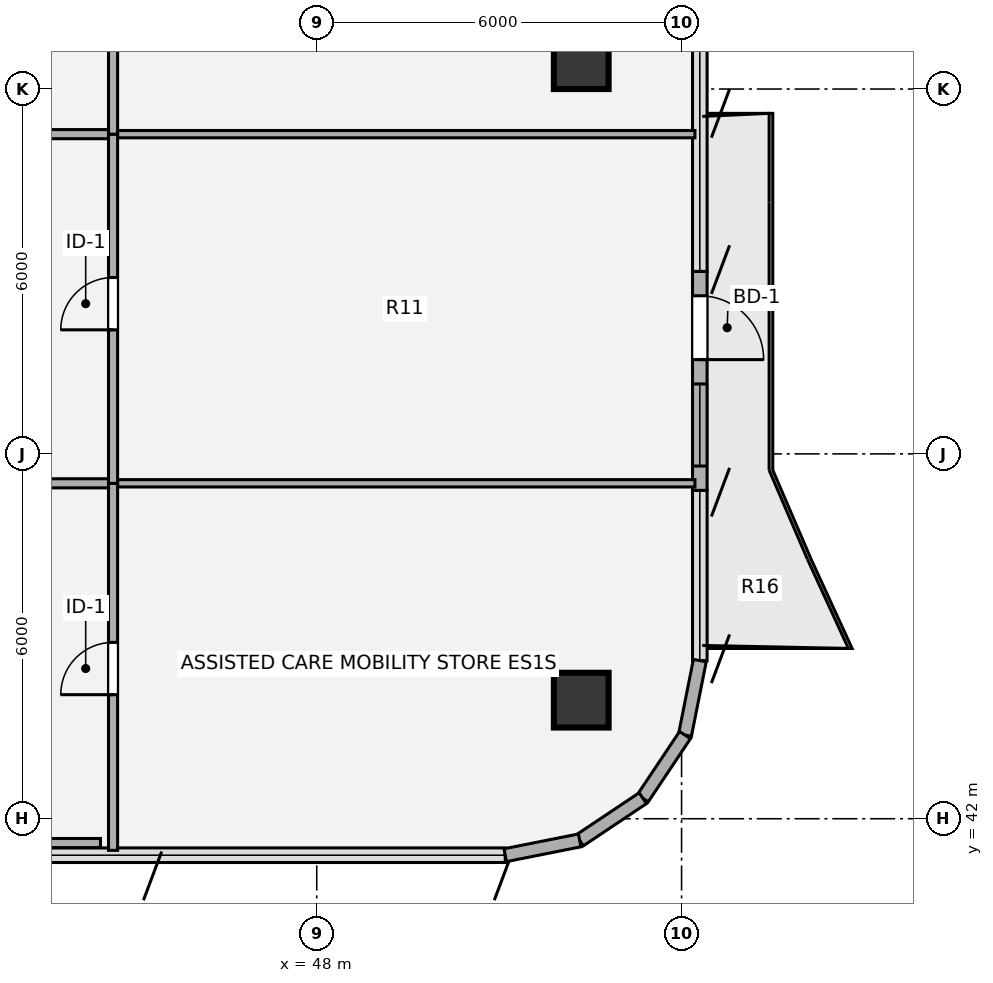
"""IFC4 building model, lengths in metres.
Left out: names, types, materials, properties, quantities, classifications, styles, units other than length and angle.
Written with IfcOpenShell. Run it as: python <this file> out.ifc"""

import sys

from ifc_helpers import new_model, si_unit, direction, frame, frame_2d, origin, origin_2d, place, context, subcontext, project, spatial, rectangle, hollow_circle, extrude, source, transform, mapped, element, fill, save


model = new_model("IFC4")
c1 = context("Model", 3, precision=1e-05, world=origin(), true_north=direction((0.0, 1.0)))
c2 = subcontext(c1, "Body", "Model", "MODEL_VIEW")
j1 = project(units=[si_unit("LENGTHUNIT", "METRE"), si_unit("PLANEANGLEUNIT", "RADIAN")], contexts=[c1])
p1 = place(None, origin())
s1 = spatial("IfcSite", under=j1, at=p1, CompositionType="ELEMENT")
p2 = place(p1, origin())
s2 = spatial("IfcBuilding", under=s1, at=p2, CompositionType="ELEMENT")
p3 = place(p2, frame((0.0, 0.0, 234.36)))
s3 = spatial("IfcBuildingStorey", under=s2, at=p3, CompositionType="ELEMENT", Elevation=234.36)
m1 = source(origin(), c2, "Body", "SweptSolid", [
    extrude(hollow_circle(Radius=0.45, WallThickness=0.032, at=origin_2d()), origin(), (0.0, 0.0, 1.0), 3.78),
])
for number, where, z_axis, x_axis in (
    (1, (52.35, 43.95, 0.0), (0.0, 0.0, 1.0), (1.0, 0.0, 0.0)),
    (2, (52.35, 54.45, 0.0), (0.0, 0.0, 1.0), (1.0, 0.0, 0.0)),
):
    element("IfcColumn", number, at=place(p3, frame(where, z_axis=z_axis, x_axis=x_axis)), inside=s3, PredefinedType="COLUMN", context=c2, shape_type="MappedRepresentation", body=[
        mapped(m1, transform((0.0, 0.0, 0.0), x_axis=(1.0, 0.0, 0.0), y_axis=(0.0, 1.0, 0.0), z_axis=(0.0, 0.0, 1.0), scale=1.0)),
    ])
p4 = place(p3, frame((54.3, 51.0, 0.0), z_axis=(0.0, 0.0, 1.0), x_axis=(0.0, -1.0, 0.0)))
e3 = element("IfcWall", 3, at=p4, inside=s3, PredefinedType="SOLIDWALL", context=c2, shape_type="SweptSolid", body=[
    extrude(rectangle(XDim=3.6, YDim=0.24, at=frame_2d((1.8, 0.0))), origin(), (0.0, 0.0, 1.0), 3.53),
])
p5 = place(p4, frame((0.4, 0.0, 0.0)))
e4 = element("IfcOpeningElement", 4, at=p5, cuts=e3, PredefinedType="OPENING", context=c2, shape_type="SweptSolid", body=[
    extrude(rectangle(XDim=1.05, YDim=2.15, at=origin_2d()), frame((0.525, 0.13, 1.075), z_axis=(0.0, -1.0, 0.0), x_axis=(1.0, 0.0, 0.0)), (0.0, 0.0, 1.0), 0.26),
])
p6 = place(p4, frame((1.85, 0.0, 0.85)))
e5 = element("IfcOpeningElement", 5, at=p6, cuts=e3, PredefinedType="OPENING", context=c2, shape_type="SweptSolid", body=[
    extrude(rectangle(XDim=1.35, YDim=1.35, at=origin_2d()), frame((0.675, 0.13, 0.675), z_axis=(0.0, -1.0, 0.0), x_axis=(1.0, 0.0, 0.0)), (0.0, 0.0, 1.0), 0.26),
])
for number, where, z_axis, x_axis in (
    (6, (54.3, 44.6, 0.0), (0.0, 0.0, 1.0), (-0.195, -0.981, 0.0)),
    (7, (54.056, 43.375, 0.0), (0.0, 0.0, 1.0), (-0.556, -0.831, 0.0)),
    (8, (53.363, 42.337, 0.0), (0.0, 0.0, 1.0), (-0.831, -0.556, 0.0)),
    (9, (52.325, 41.644, 0.0), (0.0, 0.0, 1.0), (-0.981, -0.195, 0.0)),
):
    element("IfcWall", number, at=place(p3, frame(where, z_axis=z_axis, x_axis=x_axis)), inside=s3, PredefinedType="SOLIDWALL", context=c2, shape_type="SweptSolid", body=[
        extrude(rectangle(XDim=1.249, YDim=0.215, at=frame_2d((0.624, 0.0))), origin(), (0.0, 0.0, 1.0), 3.53),
    ])
p7 = place(p3, frame((38.45, 41.6, 0.0), z_axis=(0.0, 0.0, 1.0), x_axis=(1.0, 0.0, 0.0)))
e10 = element("IfcWall", 10, at=p7, inside=s3, PredefinedType="PARTITIONING", context=c2, shape_type="SweptSolid", body=[
    extrude(rectangle(XDim=5.993, YDim=0.15, at=frame_2d((2.997, 0.0))), origin(), (0.0, 0.0, 1.0), 3.5),
])
p8 = place(p3, frame((38.45, 47.516, 0.0), z_axis=(0.0, 0.0, 1.0), x_axis=(1.0, 0.0, 0.0)))
e11 = element("IfcWall", 11, at=p8, inside=s3, PredefinedType="PARTITIONING", context=c2, shape_type="SweptSolid", body=[
    extrude(rectangle(XDim=6.2, YDim=0.15, at=frame_2d((3.1, 0.0))), origin(), (0.0, 0.0, 1.0), 2.982),
])
p9 = place(p3, frame((44.65, 47.516, 0.0), z_axis=(0.0, 0.0, 1.0), x_axis=(1.0, 0.0, 0.0)))
e12 = element("IfcWall", 12, at=p9, inside=s3, PredefinedType="PARTITIONING", context=c2, shape_type="SweptSolid", body=[
    extrude(rectangle(XDim=9.57, YDim=0.12, at=frame_2d((4.785, 0.0))), origin(), (0.0, 0.0, 1.0), 2.982),
])
p10 = place(p3, frame((38.45, 53.258, 0.0), z_axis=(0.0, 0.0, 1.0), x_axis=(1.0, 0.0, 0.0)))
e13 = element("IfcWall", 13, at=p10, inside=s3, PredefinedType="PARTITIONING", context=c2, shape_type="SweptSolid", body=[
    extrude(rectangle(XDim=6.2, YDim=0.15, at=frame_2d((3.1, 0.0))), origin(), (0.0, 0.0, 1.0), 3.055),
])
p11 = place(p3, frame((44.65, 53.258, 0.0), z_axis=(0.0, 0.0, 1.0), x_axis=(1.0, 0.0, 0.0)))
e14 = element("IfcWall", 14, at=p11, inside=s3, PredefinedType="PARTITIONING", context=c2, shape_type="SweptSolid", body=[
    extrude(rectangle(XDim=9.57, YDim=0.12, at=frame_2d((4.785, 0.0))), origin(), (0.0, 0.0, 1.0), 3.055),
])
p12 = place(p3, frame((44.65, 41.48, 0.0), z_axis=(0.0, 0.0, 1.0), x_axis=(0.0, 1.0, 0.0)))
e15 = element("IfcWall", 15, at=p12, inside=s3, PredefinedType="PARTITIONING", context=c2, shape_type="SweptSolid", body=[
    extrude(rectangle(XDim=6.036, YDim=0.15, at=frame_2d((3.018, 0.0))), origin(), (0.0, 0.0, 1.0), 3.5),
])
p13 = place(p12, frame((2.56, 0.0, 0.0)))
e16 = element("IfcOpeningElement", 16, at=p13, cuts=e15, PredefinedType="OPENING", context=c2, shape_type="SweptSolid", body=[
    extrude(rectangle(XDim=0.86, YDim=2.1, at=origin_2d()), frame((0.43, 0.085, 1.05), z_axis=(0.0, -1.0, 0.0), x_axis=(1.0, 0.0, 0.0)), (0.0, 0.0, 1.0), 0.17),
])
p14 = place(p3, frame((44.65, 47.516, 0.0), z_axis=(0.0, 0.0, 1.0), x_axis=(0.0, 1.0, 0.0)))
e17 = element("IfcWall", 17, at=p14, inside=s3, PredefinedType="PARTITIONING", context=c2, shape_type="SweptSolid", body=[
    extrude(rectangle(XDim=5.742, YDim=0.15, at=frame_2d((2.871, 0.0))), origin(), (0.0, 0.0, 1.0), 3.5),
])
p15 = place(p14, frame((2.524, 0.0, 0.0)))
e18 = element("IfcOpeningElement", 18, at=p15, cuts=e17, PredefinedType="OPENING", context=c2, shape_type="SweptSolid", body=[
    extrude(rectangle(XDim=0.86, YDim=2.1, at=origin_2d()), frame((0.43, 0.085, 1.05), z_axis=(0.0, -1.0, 0.0), x_axis=(1.0, 0.0, 0.0)), (0.0, 0.0, 1.0), 0.17),
])
p16 = place(p3, frame((44.65, 53.258, 0.0), z_axis=(0.0, 0.0, 1.0), x_axis=(0.0, 1.0, 0.0)))
e19 = element("IfcWall", 19, at=p16, inside=s3, PredefinedType="PARTITIONING", context=c2, shape_type="SweptSolid", body=[
    extrude(rectangle(XDim=6.064, YDim=0.15, at=frame_2d((3.032, 0.0))), origin(), (0.0, 0.0, 1.0), 3.5),
])
p17 = place(p16, frame((2.782, 0.0, 0.0)))
e20 = element("IfcOpeningElement", 20, at=p17, cuts=e19, PredefinedType="OPENING", context=c2, shape_type="SweptSolid", body=[
    extrude(rectangle(XDim=0.86, YDim=2.1, at=origin_2d()), frame((0.43, 0.085, 1.05), z_axis=(0.0, -1.0, 0.0), x_axis=(1.0, 0.0, 0.0)), (0.0, 0.0, 1.0), 0.17),
])
m2 = source(origin(), c2, "Body", "SweptSolid", [
    extrude(rectangle(XDim=1.05, YDim=2.15, at=origin_2d()), frame((0.525, 0.025, 1.075), z_axis=(0.0, -1.0, 0.0), x_axis=(1.0, 0.0, 0.0)), (0.0, 0.0, 1.0), 0.05),
])
p18 = place(p5, origin())
e21 = element("IfcDoor", 21, at=p18, inside=s3, OperationType="SINGLE_SWING_RIGHT", PredefinedType="DOOR", context=c2, shape_type="MappedRepresentation", body=[
    mapped(m2, transform((0.0, 0.0, 0.0), x_axis=(1.0, 0.0, 0.0), y_axis=(0.0, 1.0, 0.0), z_axis=(0.0, 0.0, 1.0), scale=1.0)),
])
fill(e4, e21)
m3 = source(origin(), c2, "Body", "SweptSolid", [
    extrude(rectangle(XDim=1.35, YDim=1.35, at=origin_2d()), frame((0.675, 0.03, 0.675), z_axis=(0.0, -1.0, 0.0), x_axis=(1.0, 0.0, 0.0)), (0.0, 0.0, 1.0), 0.06),
])
p19 = place(p6, origin())
e22 = element("IfcWindow", 22, at=p19, inside=s3, PartitioningType="SINGLE_PANEL", PredefinedType="WINDOW", context=c2, shape_type="MappedRepresentation", body=[
    mapped(m3, transform((0.0, 0.0, 0.0), x_axis=(1.0, 0.0, 0.0), y_axis=(0.0, 1.0, 0.0), z_axis=(0.0, 0.0, 1.0), scale=1.0)),
])
fill(e5, e22)
m4 = source(origin(), c2, "Body", "SweptSolid", [
    extrude(rectangle(XDim=0.86, YDim=2.1, at=origin_2d()), frame((0.43, 0.025, 1.05), z_axis=(0.0, -1.0, 0.0), x_axis=(1.0, 0.0, 0.0)), (0.0, 0.0, 1.0), 0.05),
])
p20 = place(p13, origin())
e23 = element("IfcDoor", 23, at=p20, inside=s3, OperationType="SINGLE_SWING_LEFT", PredefinedType="DOOR", context=c2, shape_type="MappedRepresentation", body=[
    mapped(m4, transform((0.0, 0.0, 0.0), x_axis=(1.0, 0.0, 0.0), y_axis=(0.0, 1.0, 0.0), z_axis=(0.0, 0.0, 1.0), scale=1.0)),
])
fill(e16, e23)
p21 = place(p15, origin())
e24 = element("IfcDoor", 24, at=p21, inside=s3, OperationType="SINGLE_SWING_LEFT", PredefinedType="DOOR", context=c2, shape_type="MappedRepresentation", body=[
    mapped(m4, transform((0.0, 0.0, 0.0), x_axis=(1.0, 0.0, 0.0), y_axis=(0.0, 1.0, 0.0), z_axis=(0.0, 0.0, 1.0), scale=1.0)),
])
fill(e18, e24)
save(model, sys.argv[1])
